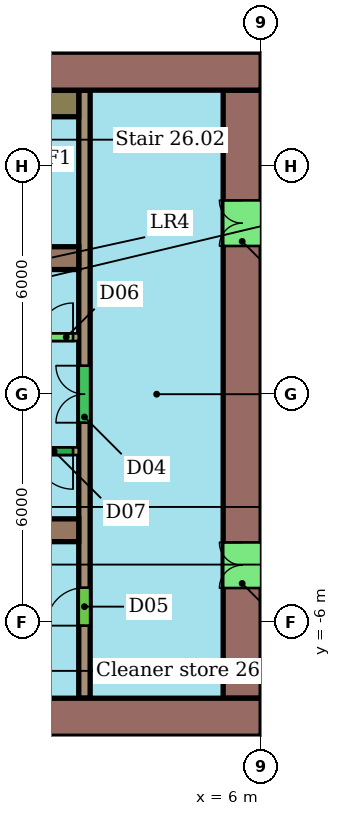
"""IFC4 building model, lengths in metres.
Left out: names, types, materials, properties, quantities, classifications, styles, units other than length and angle.
Written with IfcOpenShell. Run it as: python <this file> out.ifc"""

import sys

from ifc_helpers import new_model, si_unit, direction, frame, frame_2d, origin, place, context, subcontext, project, spatial, rectangle, extrude, element, fill, save


model = new_model("IFC4")
c1 = context("Model", 3, precision=1e-05, world=origin(), true_north=direction((0.0, 1.0)))
c2 = subcontext(c1, "Body", "Model", "MODEL_VIEW")
j1 = project(units=[si_unit("LENGTHUNIT", "METRE"), si_unit("PLANEANGLEUNIT", "RADIAN")], contexts=[c1])
p1 = place(None, origin())
s1 = spatial("IfcSite", under=j1, at=p1, CompositionType="ELEMENT")
p2 = place(p1, origin())
s2 = spatial("IfcBuilding", under=s1, at=p2, CompositionType="ELEMENT")
p3 = place(p2, frame((0.0, 0.0, 113.8)))
s3 = spatial("IfcBuildingStorey", under=s2, at=p3, CompositionType="ELEMENT", Elevation=113.8)
p4 = place(p3, frame((6.0, 8.5, 0.0), z_axis=(0.0, 0.0, 1.0), x_axis=(-1.0, 0.0, 0.0)))
e1 = element("IfcWall", 1, at=p4, inside=s3, PredefinedType="SHEAR", context=c2, shape_type="SweptSolid", body=[
    extrude(rectangle(XDim=12.0, YDim=1.0, at=frame_2d((6.0, 0.0))), origin(), (0.0, 0.0, 1.0), 3.3),
])
p5 = place(p4, frame((5.6, 0.0, 0.0)))
e2 = element("IfcOpeningElement", 2, at=p5, cuts=e1, PredefinedType="OPENING", context=c2, shape_type="SweptSolid", body=[
    extrude(rectangle(XDim=1.2, YDim=2.1, at=frame_2d((0.6, 1.05))), frame((0.0, 0.51, 0.0), z_axis=(0.0, -1.0, 0.0), x_axis=(1.0, 0.0, 0.0)), (0.0, 0.0, 1.0), 1.02),
])
p6 = place(p3, frame((-18.0, -8.5, 0.0), z_axis=(0.0, 0.0, 1.0), x_axis=(1.0, 0.0, 0.0)))
e3 = element("IfcWall", 3, at=p6, inside=s3, PredefinedType="SHEAR", context=c2, shape_type="SweptSolid", body=[
    extrude(rectangle(XDim=24.0, YDim=1.0, at=frame_2d((12.0, 0.0))), origin(), (0.0, 0.0, 1.0), 3.3),
])
p7 = place(p6, frame((6.0, 0.0, 0.0)))
e4 = element("IfcOpeningElement", 4, at=p7, cuts=e3, PredefinedType="OPENING", context=c2, shape_type="SweptSolid", body=[
    extrude(rectangle(XDim=1.2, YDim=2.1, at=frame_2d((0.6, 1.05))), frame((0.0, 0.51, 0.0), z_axis=(0.0, -1.0, 0.0), x_axis=(1.0, 0.0, 0.0)), (0.0, 0.0, 1.0), 1.02),
])
p8 = place(p3, frame((5.5, -8.0, 0.0), z_axis=(0.0, 0.0, 1.0), x_axis=(0.0, 1.0, 0.0)))
e5 = element("IfcWall", 5, at=p8, inside=s3, PredefinedType="SHEAR", context=c2, shape_type="SweptSolid", body=[
    extrude(rectangle(XDim=16.0, YDim=1.0, at=frame_2d((8.0, 0.0))), origin(), (0.0, 0.0, 1.0), 3.3),
])
p9 = place(p8, frame((2.9, 0.0, 0.0)))
e6 = element("IfcOpeningElement", 6, at=p9, cuts=e5, PredefinedType="OPENING", context=c2, shape_type="SweptSolid", body=[
    extrude(rectangle(XDim=1.2, YDim=2.1, at=frame_2d((0.6, 1.05))), frame((0.0, 0.51, 0.0), z_axis=(0.0, -1.0, 0.0), x_axis=(1.0, 0.0, 0.0)), (0.0, 0.0, 1.0), 1.02),
])
p10 = place(p8, frame((11.9, 0.0, 0.0)))
e7 = element("IfcOpeningElement", 7, at=p10, cuts=e5, PredefinedType="OPENING", context=c2, shape_type="SweptSolid", body=[
    extrude(rectangle(XDim=1.2, YDim=2.1, at=frame_2d((0.6, 1.05))), frame((0.0, 0.51, 0.0), z_axis=(0.0, -1.0, 0.0), x_axis=(1.0, 0.0, 0.0)), (0.0, 0.0, 1.0), 1.02),
])
for number, where, z_axis, x_axis in (
    (8, (-6.0, 3.58, 0.0), (0.0, 0.0, 1.0), (1.0, 0.0, 0.0)),
    (9, (-6.0, -3.58, 0.0), (0.0, 0.0, 1.0), (1.0, 0.0, 0.0)),
):
    element("IfcWall", number, at=place(p3, frame(where, z_axis=z_axis, x_axis=x_axis)), inside=s3, PredefinedType="SHEAR", context=c2, shape_type="SweptSolid", body=[
        extrude(rectangle(XDim=7.2, YDim=0.6, at=frame_2d((3.6, 0.0))), origin(), (0.0, 0.0, 1.0), 3.3),
    ])
p11 = place(p3, frame((1.35, -8.0, 0.0), z_axis=(0.0, 0.0, 1.0), x_axis=(0.0, 1.0, 0.0)))
e10 = element("IfcWall", 10, at=p11, inside=s3, PredefinedType="SHEAR", context=c2, shape_type="SweptSolid", body=[
    extrude(rectangle(XDim=16.0, YDim=0.3, at=frame_2d((8.0, 0.0))), origin(), (0.0, 0.0, 1.0), 3.3),
])
p12 = place(p11, frame((1.91, 0.0, 0.0)))
e11 = element("IfcOpeningElement", 11, at=p12, cuts=e10, PredefinedType="OPENING", context=c2, shape_type="SweptSolid", body=[
    extrude(rectangle(XDim=1.0, YDim=2.1, at=frame_2d((0.5, 1.05))), frame((0.0, 0.16, 0.0), z_axis=(0.0, -1.0, 0.0), x_axis=(1.0, 0.0, 0.0)), (0.0, 0.0, 1.0), 0.32),
])
p13 = place(p11, frame((7.25, 0.0, 0.0)))
e12 = element("IfcOpeningElement", 12, at=p13, cuts=e10, PredefinedType="OPENING", context=c2, shape_type="SweptSolid", body=[
    extrude(rectangle(XDim=1.5, YDim=2.1, at=frame_2d((0.75, 1.05))), frame((0.0, 0.16, 0.0), z_axis=(0.0, -1.0, 0.0), x_axis=(1.0, 0.0, 0.0)), (0.0, 0.0, 1.0), 0.32),
])
p14 = place(p3, frame((-13.2, 1.5, 0.0), z_axis=(0.0, 0.0, 1.0), x_axis=(1.0, 0.0, 0.0)))
e13 = element("IfcWall", 13, at=p14, inside=s3, PredefinedType="SHEAR", context=c2, shape_type="SweptSolid", body=[
    extrude(rectangle(XDim=14.4, YDim=0.2, at=frame_2d((7.2, 0.0))), origin(), (0.0, 0.0, 1.0), 3.3),
])
p15 = place(p14, frame((0.546, 0.0, 0.0)))
e14 = element("IfcOpeningElement", 14, at=p15, cuts=e13, PredefinedType="OPENING", context=c2, shape_type="SweptSolid", body=[
    extrude(rectangle(XDim=1.1, YDim=2.1, at=frame_2d((0.55, 1.05))), frame((0.0, 0.11, 0.0), z_axis=(0.0, -1.0, 0.0), x_axis=(1.0, 0.0, 0.0)), (0.0, 0.0, 1.0), 0.22),
])
p16 = place(p14, frame((2.988, 0.0, 0.0)))
e15 = element("IfcOpeningElement", 15, at=p16, cuts=e13, PredefinedType="OPENING", context=c2, shape_type="SweptSolid", body=[
    extrude(rectangle(XDim=1.1, YDim=2.1, at=frame_2d((0.55, 1.05))), frame((0.0, 0.11, 0.0), z_axis=(0.0, -1.0, 0.0), x_axis=(1.0, 0.0, 0.0)), (0.0, 0.0, 1.0), 0.22),
])
p17 = place(p14, frame((5.429, 0.0, 0.0)))
e16 = element("IfcOpeningElement", 16, at=p17, cuts=e13, PredefinedType="OPENING", context=c2, shape_type="SweptSolid", body=[
    extrude(rectangle(XDim=1.1, YDim=2.1, at=frame_2d((0.55, 1.05))), frame((0.0, 0.11, 0.0), z_axis=(0.0, -1.0, 0.0), x_axis=(1.0, 0.0, 0.0)), (0.0, 0.0, 1.0), 0.22),
])
p18 = place(p14, frame((7.871, 0.0, 0.0)))
e17 = element("IfcOpeningElement", 17, at=p18, cuts=e13, PredefinedType="OPENING", context=c2, shape_type="SweptSolid", body=[
    extrude(rectangle(XDim=1.1, YDim=2.1, at=frame_2d((0.55, 1.05))), frame((0.0, 0.11, 0.0), z_axis=(0.0, -1.0, 0.0), x_axis=(1.0, 0.0, 0.0)), (0.0, 0.0, 1.0), 0.22),
])
p19 = place(p14, frame((10.958, 0.0, 0.0)))
e18 = element("IfcOpeningElement", 18, at=p19, cuts=e13, PredefinedType="OPENING", context=c2, shape_type="SweptSolid", body=[
    extrude(rectangle(XDim=0.9, YDim=2.1, at=frame_2d((0.45, 1.05))), frame((0.0, 0.11, 0.0), z_axis=(0.0, -1.0, 0.0), x_axis=(1.0, 0.0, 0.0)), (0.0, 0.0, 1.0), 0.22),
])
p20 = place(p14, frame((13.35, 0.0, 0.0)))
e19 = element("IfcOpeningElement", 19, at=p20, cuts=e13, PredefinedType="OPENING", context=c2, shape_type="SweptSolid", body=[
    extrude(rectangle(XDim=0.9, YDim=2.1, at=frame_2d((0.45, 1.05))), frame((0.0, 0.11, 0.0), z_axis=(0.0, -1.0, 0.0), x_axis=(1.0, 0.0, 0.0)), (0.0, 0.0, 1.0), 0.22),
])
p21 = place(p3, frame((1.2, -1.5, 0.0), z_axis=(0.0, 0.0, 1.0), x_axis=(-1.0, 0.0, 0.0)))
e20 = element("IfcWall", 20, at=p21, inside=s3, PredefinedType="SHEAR", context=c2, shape_type="SweptSolid", body=[
    extrude(rectangle(XDim=14.4, YDim=0.2, at=frame_2d((7.2, 0.0))), origin(), (0.0, 0.0, 1.0), 3.3),
])
p22 = place(p21, frame((7.821, 0.0, 0.0)))
e21 = element("IfcOpeningElement", 21, at=p22, cuts=e20, PredefinedType="OPENING", context=c2, shape_type="SweptSolid", body=[
    extrude(rectangle(XDim=1.2, YDim=2.1, at=frame_2d((0.6, 1.05))), frame((0.0, 0.11, 0.0), z_axis=(0.0, -1.0, 0.0), x_axis=(1.0, 0.0, 0.0)), (0.0, 0.0, 1.0), 0.22),
])
p23 = place(p21, frame((0.15, 0.0, 0.0)))
e22 = element("IfcOpeningElement", 22, at=p23, cuts=e20, PredefinedType="OPENING", context=c2, shape_type="SweptSolid", body=[
    extrude(rectangle(XDim=1.0, YDim=2.1, at=frame_2d((0.5, 1.05))), frame((0.0, 0.11, 0.0), z_axis=(0.0, -1.0, 0.0), x_axis=(1.0, 0.0, 0.0)), (0.0, 0.0, 1.0), 0.22),
])
p24 = place(p3, frame((0.4, 7.65, 0.0), z_axis=(0.0, 0.0, 1.0), x_axis=(1.0, 0.0, 0.0)))
e23 = element("IfcWall", 23, at=p24, inside=s3, PredefinedType="SHEAR", context=c2, shape_type="SweptSolid", body=[
    extrude(rectangle(XDim=0.8, YDim=0.7, at=frame_2d((0.4, 0.0))), origin(), (0.0, 0.0, 1.0), 3.3),
])
p25 = place(p9, origin())
e24 = element("IfcDoor", 24, at=p25, inside=s3, OperationType="DOUBLE_DOOR_SINGLE_SWING", PredefinedType="NOTDEFINED", context=c2, shape_type="SweptSolid", body=[
    extrude(rectangle(XDim=1.2, YDim=2.1, at=frame_2d((0.6, 1.05))), frame((0.0, 0.025, 0.0), z_axis=(0.0, -1.0, 0.0), x_axis=(1.0, 0.0, 0.0)), (0.0, 0.0, 1.0), 0.05),
])
fill(e6, e24)
p26 = place(p10, origin())
e25 = element("IfcDoor", 25, at=p26, inside=s3, OperationType="DOUBLE_DOOR_SINGLE_SWING", PredefinedType="NOTDEFINED", context=c2, shape_type="SweptSolid", body=[
    extrude(rectangle(XDim=1.2, YDim=2.1, at=frame_2d((0.6, 1.05))), frame((0.0, 0.025, 0.0), z_axis=(0.0, -1.0, 0.0), x_axis=(1.0, 0.0, 0.0)), (0.0, 0.0, 1.0), 0.05),
])
fill(e7, e25)
p27 = place(p12, origin())
e26 = element("IfcDoor", 26, at=p27, inside=s3, OperationType="SINGLE_SWING_LEFT", PredefinedType="NOTDEFINED", context=c2, shape_type="SweptSolid", body=[
    extrude(rectangle(XDim=1.0, YDim=2.1, at=frame_2d((0.5, 1.05))), frame((0.0, 0.025, 0.0), z_axis=(0.0, -1.0, 0.0), x_axis=(1.0, 0.0, 0.0)), (0.0, 0.0, 1.0), 0.05),
])
fill(e11, e26)
p28 = place(p13, origin())
e27 = element("IfcDoor", 27, at=p28, inside=s3, OperationType="DOUBLE_DOOR_SINGLE_SWING", PredefinedType="NOTDEFINED", context=c2, shape_type="SweptSolid", body=[
    extrude(rectangle(XDim=1.5, YDim=2.1, at=frame_2d((0.75, 1.05))), frame((0.0, 0.025, 0.0), z_axis=(0.0, -1.0, 0.0), x_axis=(1.0, 0.0, 0.0)), (0.0, 0.0, 1.0), 0.05),
])
fill(e12, e27)
p29 = place(p20, origin())
e28 = element("IfcDoor", 28, at=p29, inside=s3, OperationType="SINGLE_SWING_RIGHT", PredefinedType="NOTDEFINED", context=c2, shape_type="SweptSolid", body=[
    extrude(rectangle(XDim=0.9, YDim=2.1, at=frame_2d((0.45, 1.05))), frame((0.0, 0.025, 0.0), z_axis=(0.0, -1.0, 0.0), x_axis=(1.0, 0.0, 0.0)), (0.0, 0.0, 1.0), 0.05),
])
fill(e19, e28)
p30 = place(p23, origin())
e29 = element("IfcDoor", 29, at=p30, inside=s3, OperationType="SINGLE_SWING_LEFT", PredefinedType="NOTDEFINED", context=c2, shape_type="SweptSolid", body=[
    extrude(rectangle(XDim=1.0, YDim=2.1, at=frame_2d((0.5, 1.05))), frame((0.0, 0.025, 0.0), z_axis=(0.0, -1.0, 0.0), x_axis=(1.0, 0.0, 0.0)), (0.0, 0.0, 1.0), 0.05),
])
fill(e22, e29)
save(model, sys.argv[1])
